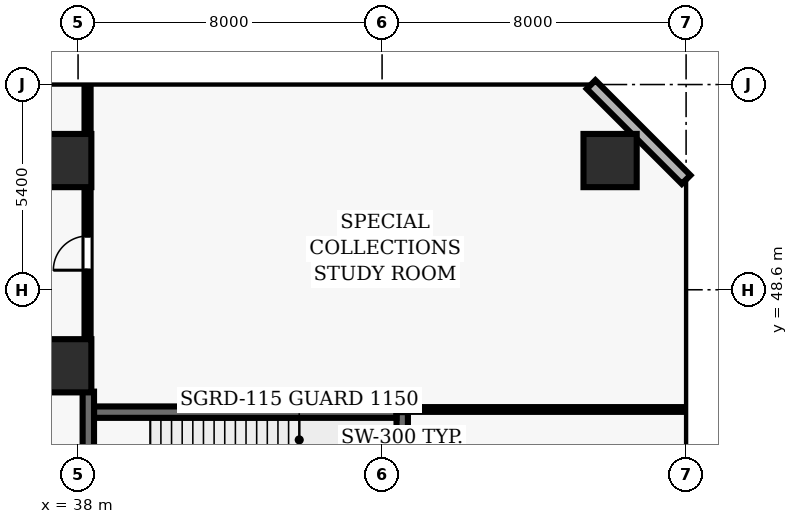
"""IFC4 building model, lengths in metres.
Left out: names, types, materials, properties, quantities, classifications, styles, units other than length and angle.
Written with IfcOpenShell. Run it as: python <this file> out.ifc"""

import sys

from ifc_helpers import new_model, si_unit, direction, frame, frame_2d, origin, origin_2d, place, context, subcontext, project, spatial, rectangle, extrude, element, fill, save


model = new_model("IFC4")
c1 = context("Model", 3, precision=1e-05, world=origin(), true_north=direction((0.0, 1.0)))
c2 = subcontext(c1, "Body", "Model", "MODEL_VIEW")
j1 = project(units=[si_unit("LENGTHUNIT", "METRE"), si_unit("PLANEANGLEUNIT", "RADIAN")], contexts=[c1])
p1 = place(None, origin())
s1 = spatial("IfcSite", under=j1, at=p1, CompositionType="ELEMENT")
p2 = place(p1, origin())
s2 = spatial("IfcBuilding", under=s1, at=p2, CompositionType="ELEMENT")
p3 = place(p2, frame((0.0, 0.0, 10.4)))
s3 = spatial("IfcBuildingStorey", under=s2, at=p3, CompositionType="ELEMENT", Elevation=10.4)
for number, where, z_axis, x_axis in (
    (1, (37.65, 46.6, 0.0), (0.0, 0.0, 1.0), (1.0, 0.0, 0.0)),
    (2, (37.65, 52.0, 0.0), (0.0, 0.0, 1.0), (1.0, 0.0, 0.0)),
    (3, (52.0, 52.0, 0.0), (0.0, 0.0, 1.0), (1.0, 0.0, 0.0)),
):
    element("IfcColumn", number, at=place(p3, frame(where, z_axis=z_axis, x_axis=x_axis)), inside=s3, PredefinedType="COLUMN", context=c2, shape_type="SweptSolid", body=[
        extrude(rectangle(XDim=1.4, YDim=1.4, at=origin_2d()), origin(), (0.0, 0.0, 1.0), 5.2),
    ])
p4 = place(p3, frame((54.0, 51.5, 0.0), z_axis=(0.0, 0.0, 1.0), x_axis=(-0.707106781187, 0.707106781187, 0.0)))
e4 = element("IfcWall", 4, at=p4, inside=s3, PredefinedType="SOLIDWALL", context=c2, shape_type="SweptSolid", body=[
    extrude(rectangle(XDim=3.536, YDim=0.32, at=frame_2d((1.768, 0.0))), origin(), (0.0, 0.0, 1.0), 4.92),
])
p5 = place(p3, frame((46.53, 41.97, 0.0), z_axis=(0.0, 0.0, 1.0), x_axis=(0.0, 1.0, 0.0)))
e5 = element("IfcWall", 5, at=p5, inside=s3, PredefinedType="SHEAR", context=c2, shape_type="SweptSolid", body=[
    extrude(rectangle(XDim=3.41, YDim=0.3, at=frame_2d((1.705, 0.0))), origin(), (0.0, 0.0, 1.0), 4.92),
])
p6 = place(p3, frame((46.38, 45.38, 0.0), z_axis=(0.0, 0.0, 1.0), x_axis=(-1.0, 0.0, 0.0)))
e6 = element("IfcWall", 6, at=p6, inside=s3, PredefinedType="SHEAR", context=c2, shape_type="SweptSolid", body=[
    extrude(rectangle(XDim=7.96, YDim=0.3, at=frame_2d((3.98, 0.0))), origin(), (0.0, 0.0, 1.0), 4.92),
])
p7 = place(p3, frame((38.27, 45.92, 0.0), z_axis=(0.0, 0.0, 1.0), x_axis=(0.0, -1.0, 0.0)))
e7 = element("IfcWall", 7, at=p7, inside=s3, PredefinedType="SHEAR", context=c2, shape_type="SweptSolid", body=[
    extrude(rectangle(XDim=3.95, YDim=0.3, at=frame_2d((1.975, 0.0))), origin(), (0.0, 0.0, 1.0), 4.92),
])
p8 = place(p7, frame((1.67, 0.0, 0.0)))
e8 = element("IfcOpeningElement", 8, at=p8, cuts=e7, PredefinedType="OPENING", context=c2, shape_type="SweptSolid", body=[
    extrude(rectangle(XDim=1.15, YDim=2.15, at=frame_2d((0.575, 1.075))), frame((0.0, 0.16, 0.0), z_axis=(0.0, -1.0, 0.0), x_axis=(1.0, 0.0, 0.0)), (0.0, 0.0, 1.0), 0.32),
])
p9 = place(p3, frame((46.38, 45.45, 0.0), z_axis=(0.0, 0.0, 1.0), x_axis=(1.0, 0.0, 0.0)))
e9 = element("IfcWall", 9, at=p9, inside=s3, PredefinedType="PARTITIONING", context=c2, shape_type="SweptSolid", body=[
    extrude(rectangle(XDim=7.53, YDim=0.125, at=frame_2d((3.765, 0.0))), origin(), (0.0, 0.0, 1.0), 4.92),
])
p10 = place(p3, frame((38.25, 45.92, 0.0), z_axis=(0.0, 0.0, 1.0), x_axis=(0.0, 1.0, 0.0)))
e10 = element("IfcWall", 10, at=p10, inside=s3, PredefinedType="PARTITIONING", context=c2, shape_type="SweptSolid", body=[
    extrude(rectangle(XDim=7.99, YDim=0.16, at=frame_2d((3.995, 0.0))), origin(), (0.0, 0.0, 1.0), 4.92),
])
p11 = place(p10, frame((3.195, 0.0, 0.0)))
e11 = element("IfcOpeningElement", 11, at=p11, cuts=e10, PredefinedType="OPENING", context=c2, shape_type="SweptSolid", body=[
    extrude(rectangle(XDim=0.9, YDim=2.1, at=frame_2d((0.45, 1.05))), frame((0.0, 0.09, 0.0), z_axis=(0.0, -1.0, 0.0), x_axis=(1.0, 0.0, 0.0)), (0.0, 0.0, 1.0), 0.18),
])
p12 = place(p11, origin())
e12 = element("IfcDoor", 12, at=p12, inside=s3, OperationType="SINGLE_SWING_LEFT", PredefinedType="DOOR", context=c2, shape_type="SweptSolid", body=[
    extrude(rectangle(XDim=0.9, YDim=2.1, at=frame_2d((0.45, 1.05))), frame((0.0, 0.025, 0.0), z_axis=(0.0, -1.0, 0.0), x_axis=(1.0, 0.0, 0.0)), (0.0, 0.0, 1.0), 0.05),
])
fill(e11, e12)
save(model, sys.argv[1])
